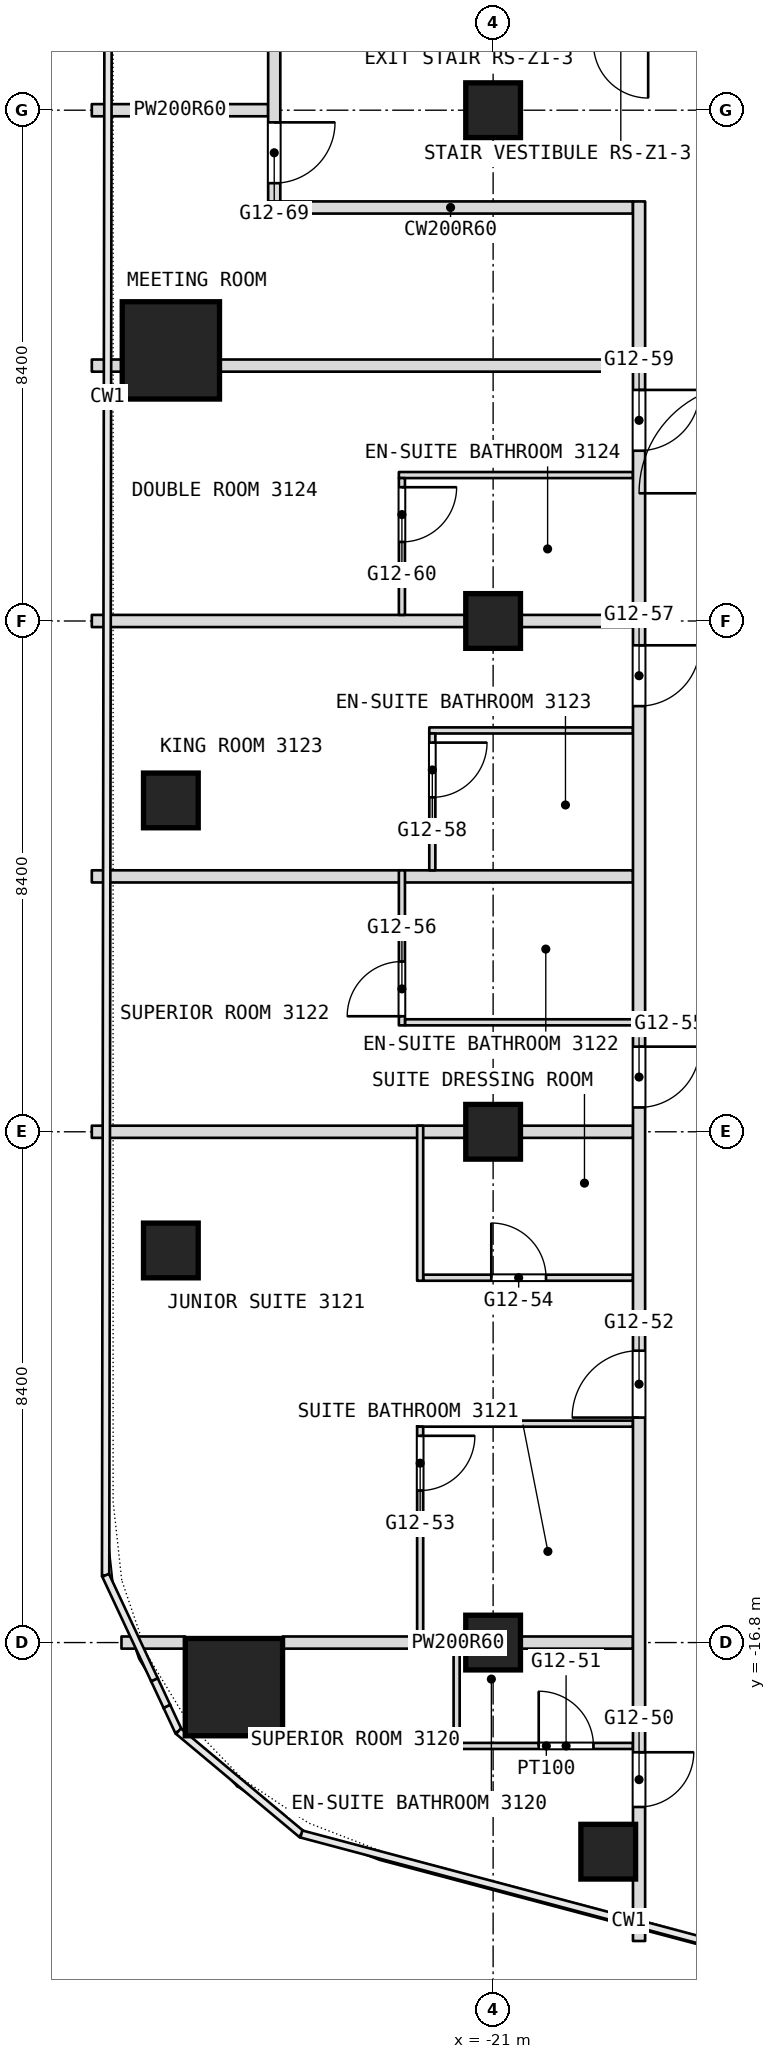
"""IFC4 building model, lengths in metres.
Left out: names, types, materials, properties, quantities, classifications, styles, units other than length and angle.
Written with IfcOpenShell. Run it as: python <this file> out.ifc"""

import sys

from ifc_helpers import new_model, si_unit, direction, frame, frame_2d, origin, origin_2d, place, context, subcontext, project, spatial, rectangle, extrude, element, fill, save


model = new_model("IFC4")
c1 = context("Model", 3, precision=1e-05, world=origin(), true_north=direction((0.0, 1.0)))
c2 = subcontext(c1, "Body", "Model", "MODEL_VIEW")
j1 = project(units=[si_unit("LENGTHUNIT", "METRE"), si_unit("PLANEANGLEUNIT", "RADIAN")], contexts=[c1])
p1 = place(None, origin())
s1 = spatial("IfcSite", under=j1, at=p1, CompositionType="ELEMENT")
p2 = place(p1, origin())
s2 = spatial("IfcBuilding", under=s1, at=p2, CompositionType="ELEMENT")
p3 = place(p2, frame((0.0, 0.0, 137.3)))
s3 = spatial("IfcBuildingStorey", under=s2, at=p3, CompositionType="ELEMENT", Elevation=137.3)
for number, where, z_axis, x_axis in (
    (1, (-25.263, -17.533, 0.0), (0.0, 0.0, 1.0), (1.0, 0.0, 0.0)),
    (2, (-26.3, 4.45, 0.0), (0.0, 0.0, 1.0), (1.0, 0.0, 0.0)),
):
    element("IfcColumn", number, at=place(p3, frame(where, z_axis=z_axis, x_axis=x_axis)), inside=s3, PredefinedType="COLUMN", context=c2, shape_type="SweptSolid", body=[
        extrude(rectangle(XDim=1.6, YDim=1.6, at=origin_2d()), origin(), (0.0, 0.0, 1.0), 3.6),
    ])
for number, where, z_axis, x_axis in (
    (3, (-21.0, -16.8, 0.0), (0.0, 0.0, 1.0), (1.0, 0.0, 0.0)),
    (4, (-21.0, -8.4, 0.0), (0.0, 0.0, 1.0), (1.0, 0.0, 0.0)),
    (5, (-21.0, 0.0, 0.0), (0.0, 0.0, 1.0), (1.0, 0.0, 0.0)),
    (6, (-21.0, 8.4, 0.0), (0.0, 0.0, 1.0), (1.0, 0.0, 0.0)),
    (7, (-26.3, -10.352, 0.0), (0.0, 0.0, 1.0), (1.0, 0.0, 0.0)),
    (8, (-26.3, -2.951, 0.0), (0.0, 0.0, 1.0), (1.0, 0.0, 0.0)),
    (9, (-19.107, -20.239, 0.0), (0.0, 0.0, 1.0), (1.0, 0.0, 0.0)),
):
    element("IfcColumn", number, at=place(p3, frame(where, z_axis=z_axis, x_axis=x_axis)), inside=s3, PredefinedType="COLUMN", context=c2, shape_type="SweptSolid", body=[
        extrude(rectangle(XDim=0.9, YDim=0.9, at=origin_2d()), origin(), (0.0, 0.0, 1.0), 3.6),
    ])
p4 = place(p3, frame((-21.55, -18.5, 0.0), z_axis=(0.0, 0.0, 1.0), x_axis=(1.0, 0.0, 0.0)))
e10 = element("IfcWall", 10, at=p4, inside=s3, PredefinedType="PARTITIONING", context=c2, shape_type="SweptSolid", body=[
    extrude(rectangle(XDim=2.85, YDim=0.1, at=frame_2d((1.425, 0.0))), origin(), (0.0, 0.0, 1.0), 3.34),
])
p5 = place(p4, frame((1.3, 0.0, 0.0)))
e11 = element("IfcOpeningElement", 11, at=p5, cuts=e10, PredefinedType="OPENING", context=c2, shape_type="SweptSolid", body=[
    extrude(rectangle(XDim=0.9, YDim=2.1, at=frame_2d((0.45, 1.05))), frame((0.0, 0.05, 0.0), z_axis=(0.0, -1.0, 0.0), x_axis=(1.0, 0.0, 0.0)), (0.0, 0.0, 1.0), 0.1),
])
p6 = place(p3, frame((-27.112, -16.8, 0.0), z_axis=(0.0, 0.0, 1.0), x_axis=(1.0, 0.0, 0.0)))
e12 = element("IfcWall", 12, at=p6, inside=s3, PredefinedType="PARTITIONING", context=c2, shape_type="SweptSolid", body=[
    extrude(rectangle(XDim=1.049, YDim=0.2, at=frame_2d((0.524, 0.0))), origin(), (0.0, 0.0, 1.0), 3.34),
])
p7 = place(p3, frame((-24.463, -16.8, 0.0), z_axis=(0.0, 0.0, 1.0), x_axis=(1.0, 0.0, 0.0)))
e13 = element("IfcWall", 13, at=p7, inside=s3, PredefinedType="PARTITIONING", context=c2, shape_type="SweptSolid", body=[
    extrude(rectangle(XDim=5.763, YDim=0.2, at=frame_2d((2.881, 0.0))), origin(), (0.0, 0.0, 1.0), 2.89),
])
p8 = place(p3, frame((-22.25, -13.2, 0.0), z_axis=(0.0, 0.0, 1.0), x_axis=(1.0, 0.0, 0.0)))
e14 = element("IfcWall", 14, at=p8, inside=s3, PredefinedType="PARTITIONING", context=c2, shape_type="SweptSolid", body=[
    extrude(rectangle(XDim=3.55, YDim=0.1, at=frame_2d((1.775, 0.0))), origin(), (0.0, 0.0, 1.0), 3.34),
])
p9 = place(p3, frame((-22.15, -10.8, 0.0), z_axis=(0.0, 0.0, 1.0), x_axis=(1.0, 0.0, 0.0)))
e15 = element("IfcWall", 15, at=p9, inside=s3, PredefinedType="PARTITIONING", context=c2, shape_type="SweptSolid", body=[
    extrude(rectangle(XDim=3.45, YDim=0.1, at=frame_2d((1.725, 0.0))), origin(), (0.0, 0.0, 1.0), 3.34),
])
p10 = place(p9, frame((1.12, 0.0, 0.0)))
e16 = element("IfcOpeningElement", 16, at=p10, cuts=e15, PredefinedType="OPENING", context=c2, shape_type="SweptSolid", body=[
    extrude(rectangle(XDim=0.9, YDim=2.1, at=frame_2d((0.45, 1.05))), frame((0.0, 0.05, 0.0), z_axis=(0.0, -1.0, 0.0), x_axis=(1.0, 0.0, 0.0)), (0.0, 0.0, 1.0), 0.1),
])
p11 = place(p3, frame((-27.6, -8.4, 0.0), z_axis=(0.0, 0.0, 1.0), x_axis=(1.0, 0.0, 0.0)))
e17 = element("IfcWall", 17, at=p11, inside=s3, PredefinedType="PARTITIONING", context=c2, shape_type="SweptSolid", body=[
    extrude(rectangle(XDim=8.9, YDim=0.2, at=frame_2d((4.45, 0.0))), origin(), (0.0, 0.0, 1.0), 2.89),
])
p12 = place(p3, frame((-22.45, -6.6, 0.0), z_axis=(0.0, 0.0, 1.0), x_axis=(1.0, 0.0, 0.0)))
e18 = element("IfcWall", 18, at=p12, inside=s3, PredefinedType="PARTITIONING", context=c2, shape_type="SweptSolid", body=[
    extrude(rectangle(XDim=3.75, YDim=0.1, at=frame_2d((1.875, 0.0))), origin(), (0.0, 0.0, 1.0), 3.34),
])
p13 = place(p3, frame((-27.6, -4.2, 0.0), z_axis=(0.0, 0.0, 1.0), x_axis=(1.0, 0.0, 0.0)))
e19 = element("IfcWall", 19, at=p13, inside=s3, PredefinedType="PARTITIONING", context=c2, shape_type="SweptSolid", body=[
    extrude(rectangle(XDim=8.9, YDim=0.2, at=frame_2d((4.45, 0.0))), origin(), (0.0, 0.0, 1.0), 3.34),
])
p14 = place(p3, frame((-22.05, -1.8, 0.0), z_axis=(0.0, 0.0, 1.0), x_axis=(1.0, 0.0, 0.0)))
e20 = element("IfcWall", 20, at=p14, inside=s3, PredefinedType="PARTITIONING", context=c2, shape_type="SweptSolid", body=[
    extrude(rectangle(XDim=3.35, YDim=0.1, at=frame_2d((1.675, 0.0))), origin(), (0.0, 0.0, 1.0), 3.34),
])
p15 = place(p3, frame((-27.6, 0.0, 0.0), z_axis=(0.0, 0.0, 1.0), x_axis=(1.0, 0.0, 0.0)))
e21 = element("IfcWall", 21, at=p15, inside=s3, PredefinedType="PARTITIONING", context=c2, shape_type="SweptSolid", body=[
    extrude(rectangle(XDim=8.9, YDim=0.2, at=frame_2d((4.45, 0.0))), origin(), (0.0, 0.0, 1.0), 2.89),
])
p16 = place(p3, frame((-22.55, 2.4, 0.0), z_axis=(0.0, 0.0, 1.0), x_axis=(1.0, 0.0, 0.0)))
e22 = element("IfcWall", 22, at=p16, inside=s3, PredefinedType="PARTITIONING", context=c2, shape_type="SweptSolid", body=[
    extrude(rectangle(XDim=3.85, YDim=0.1, at=frame_2d((1.925, 0.0))), origin(), (0.0, 0.0, 1.0), 3.34),
])
p17 = place(p3, frame((-27.6, 4.2, 0.0), z_axis=(0.0, 0.0, 1.0), x_axis=(1.0, 0.0, 0.0)))
e23 = element("IfcWall", 23, at=p17, inside=s3, PredefinedType="PARTITIONING", context=c2, shape_type="SweptSolid", body=[
    extrude(rectangle(XDim=0.5, YDim=0.2, at=frame_2d((0.25, 0.0))), origin(), (0.0, 0.0, 1.0), 3.34),
])
p18 = place(p3, frame((-25.5, 4.2, 0.0), z_axis=(0.0, 0.0, 1.0), x_axis=(1.0, 0.0, 0.0)))
e24 = element("IfcWall", 24, at=p18, inside=s3, PredefinedType="PARTITIONING", context=c2, shape_type="SweptSolid", body=[
    extrude(rectangle(XDim=6.8, YDim=0.2, at=frame_2d((3.4, 0.0))), origin(), (0.0, 0.0, 1.0), 3.34),
])
p19 = place(p3, frame((-24.7, 6.8, 0.0), z_axis=(0.0, 0.0, 1.0), x_axis=(1.0, 0.0, 0.0)))
e25 = element("IfcWall", 25, at=p19, inside=s3, PredefinedType="PARTITIONING", context=c2, shape_type="SweptSolid", body=[
    extrude(rectangle(XDim=6.0, YDim=0.2, at=frame_2d((3.0, 0.0))), origin(), (0.0, 0.0, 1.0), 3.34),
])
p20 = place(p3, frame((-27.6, 8.4, 0.0), z_axis=(0.0, 0.0, 1.0), x_axis=(1.0, 0.0, 0.0)))
e26 = element("IfcWall", 26, at=p20, inside=s3, PredefinedType="PARTITIONING", context=c2, shape_type="SweptSolid", body=[
    extrude(rectangle(XDim=2.9, YDim=0.2, at=frame_2d((1.45, 0.0))), origin(), (0.0, 0.0, 1.0), 2.89),
])
p21 = place(p3, frame((-18.6, -21.708, 0.0), z_axis=(0.0, 0.0, 1.0), x_axis=(0.0, 1.0, 0.0)))
e27 = element("IfcWall", 27, at=p21, inside=s3, PredefinedType="PARTITIONING", context=c2, shape_type="SweptSolid", body=[
    extrude(rectangle(XDim=28.608, YDim=0.2, at=frame_2d((14.304, 0.0))), origin(), (0.0, 0.0, 1.0), 3.34),
])
p22 = place(p21, frame((2.204, 0.0, 0.0)))
e28 = element("IfcOpeningElement", 28, at=p22, cuts=e27, PredefinedType="OPENING", context=c2, shape_type="SweptSolid", body=[
    extrude(rectangle(XDim=0.9, YDim=2.1, at=frame_2d((0.45, 1.05))), frame((0.0, 0.1, 0.0), z_axis=(0.0, -1.0, 0.0), x_axis=(1.0, 0.0, 0.0)), (0.0, 0.0, 1.0), 0.2),
])
p23 = place(p21, frame((8.608, 0.0, 0.0)))
e29 = element("IfcOpeningElement", 29, at=p23, cuts=e27, PredefinedType="OPENING", context=c2, shape_type="SweptSolid", body=[
    extrude(rectangle(XDim=1.1, YDim=2.1, at=frame_2d((0.55, 1.05))), frame((0.0, 0.1, 0.0), z_axis=(0.0, -1.0, 0.0), x_axis=(1.0, 0.0, 0.0)), (0.0, 0.0, 1.0), 0.2),
])
p24 = place(p21, frame((13.708, 0.0, 0.0)))
e30 = element("IfcOpeningElement", 30, at=p24, cuts=e27, PredefinedType="OPENING", context=c2, shape_type="SweptSolid", body=[
    extrude(rectangle(XDim=1.0, YDim=2.1, at=frame_2d((0.5, 1.05))), frame((0.0, 0.1, 0.0), z_axis=(0.0, -1.0, 0.0), x_axis=(1.0, 0.0, 0.0)), (0.0, 0.0, 1.0), 0.2),
])
p25 = place(p21, frame((20.308, 0.0, 0.0)))
e31 = element("IfcOpeningElement", 31, at=p25, cuts=e27, PredefinedType="OPENING", context=c2, shape_type="SweptSolid", body=[
    extrude(rectangle(XDim=1.0, YDim=2.1, at=frame_2d((0.5, 1.05))), frame((0.0, 0.1, 0.0), z_axis=(0.0, -1.0, 0.0), x_axis=(1.0, 0.0, 0.0)), (0.0, 0.0, 1.0), 0.2),
])
p26 = place(p21, frame((24.508, 0.0, 0.0)))
e32 = element("IfcOpeningElement", 32, at=p26, cuts=e27, PredefinedType="OPENING", context=c2, shape_type="SweptSolid", body=[
    extrude(rectangle(XDim=1.0, YDim=2.1, at=frame_2d((0.5, 1.05))), frame((0.0, 0.1, 0.0), z_axis=(0.0, -1.0, 0.0), x_axis=(1.0, 0.0, 0.0)), (0.0, 0.0, 1.0), 0.2),
])
p27 = place(p3, frame((-21.6, -18.55, 0.0), z_axis=(0.0, 0.0, 1.0), x_axis=(0.0, 1.0, 0.0)))
e33 = element("IfcWall", 33, at=p27, inside=s3, PredefinedType="PARTITIONING", context=c2, shape_type="SweptSolid", body=[
    extrude(rectangle(XDim=1.85, YDim=0.1, at=frame_2d((0.925, 0.0))), origin(), (0.0, 0.0, 1.0), 3.34),
])
p28 = place(p3, frame((-22.0, -4.1, 0.0), z_axis=(0.0, 0.0, 1.0), x_axis=(0.0, 1.0, 0.0)))
e34 = element("IfcWall", 34, at=p28, inside=s3, PredefinedType="PARTITIONING", context=c2, shape_type="SweptSolid", body=[
    extrude(rectangle(XDim=2.25, YDim=0.1, at=frame_2d((1.125, 0.0))), origin(), (0.0, 0.0, 1.0), 3.34),
])
p29 = place(p28, frame((1.2, 0.0, 0.0)))
e35 = element("IfcOpeningElement", 35, at=p29, cuts=e34, PredefinedType="OPENING", context=c2, shape_type="SweptSolid", body=[
    extrude(rectangle(XDim=0.9, YDim=2.1, at=frame_2d((0.45, 1.05))), frame((0.0, 0.05, 0.0), z_axis=(0.0, -1.0, 0.0), x_axis=(1.0, 0.0, 0.0)), (0.0, 0.0, 1.0), 0.1),
])
p30 = place(p3, frame((-22.2, -16.7, 0.0), z_axis=(0.0, 0.0, 1.0), x_axis=(0.0, 1.0, 0.0)))
e36 = element("IfcWall", 36, at=p30, inside=s3, PredefinedType="PARTITIONING", context=c2, shape_type="SweptSolid", body=[
    extrude(rectangle(XDim=3.45, YDim=0.1, at=frame_2d((1.725, 0.0))), origin(), (0.0, 0.0, 1.0), 3.34),
])
p31 = place(p30, frame((2.4, 0.0, 0.0)))
e37 = element("IfcOpeningElement", 37, at=p31, cuts=e36, PredefinedType="OPENING", context=c2, shape_type="SweptSolid", body=[
    extrude(rectangle(XDim=0.9, YDim=2.1, at=frame_2d((0.45, 1.05))), frame((0.0, 0.05, 0.0), z_axis=(0.0, -1.0, 0.0), x_axis=(1.0, 0.0, 0.0)), (0.0, 0.0, 1.0), 0.1),
])
p32 = place(p3, frame((-22.2, -10.85, 0.0), z_axis=(0.0, 0.0, 1.0), x_axis=(0.0, 1.0, 0.0)))
e38 = element("IfcWall", 38, at=p32, inside=s3, PredefinedType="PARTITIONING", context=c2, shape_type="SweptSolid", body=[
    extrude(rectangle(XDim=2.55, YDim=0.1, at=frame_2d((1.275, 0.0))), origin(), (0.0, 0.0, 1.0), 3.34),
])
p33 = place(p3, frame((-22.5, -6.65, 0.0), z_axis=(0.0, 0.0, 1.0), x_axis=(0.0, 1.0, 0.0)))
e39 = element("IfcWall", 39, at=p33, inside=s3, PredefinedType="PARTITIONING", context=c2, shape_type="SweptSolid", body=[
    extrude(rectangle(XDim=2.55, YDim=0.1, at=frame_2d((1.275, 0.0))), origin(), (0.0, 0.0, 1.0), 3.34),
])
p34 = place(p33, frame((0.15, 0.0, 0.0)))
e40 = element("IfcOpeningElement", 40, at=p34, cuts=e39, PredefinedType="OPENING", context=c2, shape_type="SweptSolid", body=[
    extrude(rectangle(XDim=0.9, YDim=2.1, at=frame_2d((0.45, 1.05))), frame((0.0, 0.05, 0.0), z_axis=(0.0, -1.0, 0.0), x_axis=(1.0, 0.0, 0.0)), (0.0, 0.0, 1.0), 0.1),
])
p35 = place(p3, frame((-22.5, 0.1, 0.0), z_axis=(0.0, 0.0, 1.0), x_axis=(0.0, 1.0, 0.0)))
e41 = element("IfcWall", 41, at=p35, inside=s3, PredefinedType="PARTITIONING", context=c2, shape_type="SweptSolid", body=[
    extrude(rectangle(XDim=2.25, YDim=0.1, at=frame_2d((1.125, 0.0))), origin(), (0.0, 0.0, 1.0), 3.34),
])
p36 = place(p35, frame((1.2, 0.0, 0.0)))
e42 = element("IfcOpeningElement", 42, at=p36, cuts=e41, PredefinedType="OPENING", context=c2, shape_type="SweptSolid", body=[
    extrude(rectangle(XDim=0.9, YDim=2.1, at=frame_2d((0.45, 1.05))), frame((0.0, 0.05, 0.0), z_axis=(0.0, -1.0, 0.0), x_axis=(1.0, 0.0, 0.0)), (0.0, 0.0, 1.0), 0.1),
])
p37 = place(p3, frame((-24.6, 6.9, 0.0), z_axis=(0.0, 0.0, 1.0), x_axis=(0.0, 1.0, 0.0)))
e43 = element("IfcWall", 43, at=p37, inside=s3, PredefinedType="PARTITIONING", context=c2, shape_type="SweptSolid", body=[
    extrude(rectangle(XDim=11.6, YDim=0.2, at=frame_2d((5.8, 0.0))), origin(), (0.0, 0.0, 1.0), 3.34),
])
p38 = place(p37, frame((5.45, 0.0, 0.0)))
e44 = element("IfcOpeningElement", 44, at=p38, cuts=e43, PredefinedType="OPENING", context=c2, shape_type="SweptSolid", body=[
    extrude(rectangle(XDim=1.8, YDim=2.1, at=frame_2d((0.9, 1.05))), frame((0.0, 0.1, 0.0), z_axis=(0.0, -1.0, 0.0), x_axis=(1.0, 0.0, 0.0)), (0.0, 0.0, 1.0), 0.2),
])
p39 = place(p37, frame((0.3, 0.0, 0.0)))
e45 = element("IfcOpeningElement", 45, at=p39, cuts=e43, PredefinedType="OPENING", context=c2, shape_type="SweptSolid", body=[
    extrude(rectangle(XDim=1.0, YDim=2.1, at=frame_2d((0.5, 1.05))), frame((0.0, 0.1, 0.0), z_axis=(0.0, -1.0, 0.0), x_axis=(1.0, 0.0, 0.0)), (0.0, 0.0, 1.0), 0.2),
])
p40 = place(p5, origin())
e46 = element("IfcDoor", 46, at=p40, inside=s3, OperationType="SINGLE_SWING_RIGHT", PredefinedType="DOOR", context=c2, shape_type="SweptSolid", body=[
    extrude(rectangle(XDim=0.9, YDim=2.1, at=frame_2d((0.45, 1.05))), frame((0.0, 0.025, 0.0), z_axis=(0.0, -1.0, 0.0), x_axis=(1.0, 0.0, 0.0)), (0.0, 0.0, 1.0), 0.05),
])
fill(e11, e46)
p41 = place(p10, origin())
e47 = element("IfcDoor", 47, at=p41, inside=s3, OperationType="SINGLE_SWING_LEFT", PredefinedType="DOOR", context=c2, shape_type="SweptSolid", body=[
    extrude(rectangle(XDim=0.9, YDim=2.1, at=frame_2d((0.45, 1.05))), frame((0.0, 0.025, 0.0), z_axis=(0.0, -1.0, 0.0), x_axis=(1.0, 0.0, 0.0)), (0.0, 0.0, 1.0), 0.05),
])
fill(e16, e47)
p42 = place(p22, origin())
e48 = element("IfcDoor", 48, at=p42, inside=s3, OperationType="SINGLE_SWING_RIGHT", PredefinedType="DOOR", context=c2, shape_type="SweptSolid", body=[
    extrude(rectangle(XDim=0.9, YDim=2.1, at=frame_2d((0.45, 1.05))), frame((0.0, 0.025, 0.0), z_axis=(0.0, -1.0, 0.0), x_axis=(1.0, 0.0, 0.0)), (0.0, 0.0, 1.0), 0.05),
])
fill(e28, e48)
p43 = place(p23, origin())
e49 = element("IfcDoor", 49, at=p43, inside=s3, OperationType="SINGLE_SWING_LEFT", PredefinedType="DOOR", context=c2, shape_type="SweptSolid", body=[
    extrude(rectangle(XDim=1.1, YDim=2.1, at=frame_2d((0.55, 1.05))), frame((0.0, 0.025, 0.0), z_axis=(0.0, -1.0, 0.0), x_axis=(1.0, 0.0, 0.0)), (0.0, 0.0, 1.0), 0.05),
])
fill(e29, e49)
p44 = place(p24, origin())
e50 = element("IfcDoor", 50, at=p44, inside=s3, OperationType="SINGLE_SWING_RIGHT", PredefinedType="DOOR", context=c2, shape_type="SweptSolid", body=[
    extrude(rectangle(XDim=1.0, YDim=2.1, at=frame_2d((0.5, 1.05))), frame((0.0, 0.025, 0.0), z_axis=(0.0, -1.0, 0.0), x_axis=(1.0, 0.0, 0.0)), (0.0, 0.0, 1.0), 0.05),
])
fill(e30, e50)
p45 = place(p25, origin())
e51 = element("IfcDoor", 51, at=p45, inside=s3, OperationType="SINGLE_SWING_RIGHT", PredefinedType="DOOR", context=c2, shape_type="SweptSolid", body=[
    extrude(rectangle(XDim=1.0, YDim=2.1, at=frame_2d((0.5, 1.05))), frame((0.0, 0.025, 0.0), z_axis=(0.0, -1.0, 0.0), x_axis=(1.0, 0.0, 0.0)), (0.0, 0.0, 1.0), 0.05),
])
fill(e31, e51)
p46 = place(p26, origin())
e52 = element("IfcDoor", 52, at=p46, inside=s3, OperationType="SINGLE_SWING_RIGHT", PredefinedType="DOOR", context=c2, shape_type="SweptSolid", body=[
    extrude(rectangle(XDim=1.0, YDim=2.1, at=frame_2d((0.5, 1.05))), frame((0.0, 0.025, 0.0), z_axis=(0.0, -1.0, 0.0), x_axis=(1.0, 0.0, 0.0)), (0.0, 0.0, 1.0), 0.05),
])
fill(e32, e52)
p47 = place(p29, origin())
e53 = element("IfcDoor", 53, at=p47, inside=s3, OperationType="SINGLE_SWING_LEFT", PredefinedType="DOOR", context=c2, shape_type="SweptSolid", body=[
    extrude(rectangle(XDim=0.9, YDim=2.1, at=frame_2d((0.45, 1.05))), frame((0.0, 0.025, 0.0), z_axis=(0.0, -1.0, 0.0), x_axis=(1.0, 0.0, 0.0)), (0.0, 0.0, 1.0), 0.05),
])
fill(e35, e53)
p48 = place(p31, origin())
e54 = element("IfcDoor", 54, at=p48, inside=s3, OperationType="SINGLE_SWING_LEFT", PredefinedType="DOOR", context=c2, shape_type="SweptSolid", body=[
    extrude(rectangle(XDim=0.9, YDim=2.1, at=frame_2d((0.45, 1.05))), frame((0.0, 0.025, 0.0), z_axis=(0.0, -1.0, 0.0), x_axis=(1.0, 0.0, 0.0)), (0.0, 0.0, 1.0), 0.05),
])
fill(e37, e54)
p49 = place(p34, origin())
e55 = element("IfcDoor", 55, at=p49, inside=s3, OperationType="SINGLE_SWING_RIGHT", PredefinedType="DOOR", context=c2, shape_type="SweptSolid", body=[
    extrude(rectangle(XDim=0.9, YDim=2.1, at=frame_2d((0.45, 1.05))), frame((0.0, 0.025, 0.0), z_axis=(0.0, -1.0, 0.0), x_axis=(1.0, 0.0, 0.0)), (0.0, 0.0, 1.0), 0.05),
])
fill(e40, e55)
p50 = place(p36, origin())
e56 = element("IfcDoor", 56, at=p50, inside=s3, OperationType="SINGLE_SWING_LEFT", PredefinedType="DOOR", context=c2, shape_type="SweptSolid", body=[
    extrude(rectangle(XDim=0.9, YDim=2.1, at=frame_2d((0.45, 1.05))), frame((0.0, 0.025, 0.0), z_axis=(0.0, -1.0, 0.0), x_axis=(1.0, 0.0, 0.0)), (0.0, 0.0, 1.0), 0.05),
])
fill(e42, e56)
p51 = place(p39, origin())
e57 = element("IfcDoor", 57, at=p51, inside=s3, OperationType="SINGLE_SWING_LEFT", PredefinedType="DOOR", context=c2, shape_type="SweptSolid", body=[
    extrude(rectangle(XDim=1.0, YDim=2.1, at=frame_2d((0.5, 1.05))), frame((0.0, 0.025, 0.0), z_axis=(0.0, -1.0, 0.0), x_axis=(1.0, 0.0, 0.0)), (0.0, 0.0, 1.0), 0.05),
])
fill(e45, e57)
save(model, sys.argv[1])
